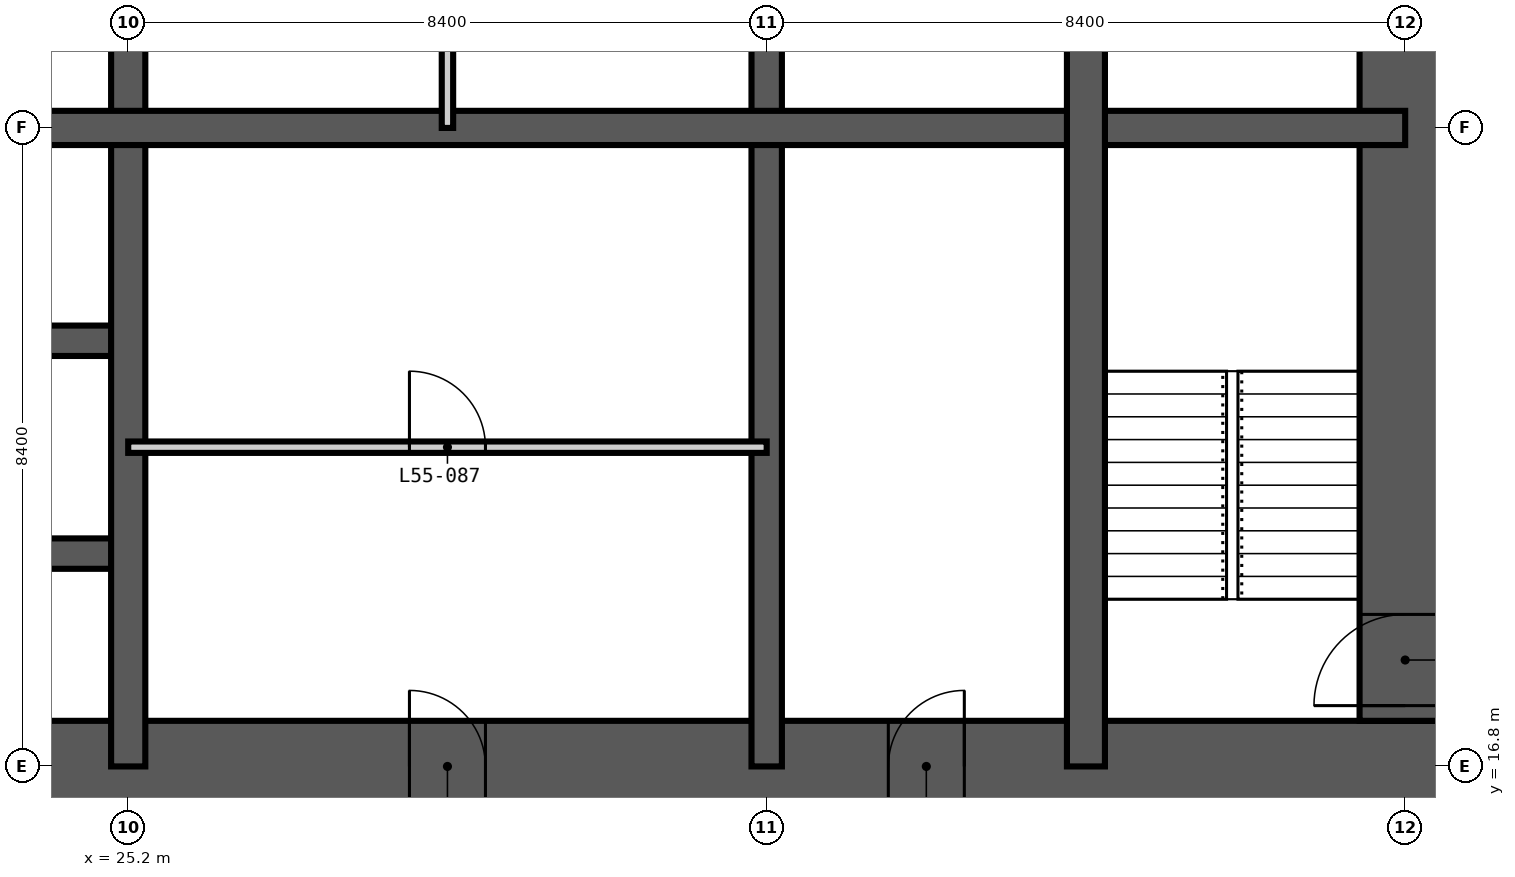
"""IFC4 building model, lengths in metres.
Left out: names, types, materials, properties, quantities, classifications, styles, units other than length and angle.
Written with IfcOpenShell. Run it as: python <this file> out.ifc"""

import sys

from ifc_helpers import new_model, si_unit, direction, frame, frame_2d, origin, place, context, subcontext, project, spatial, rectangle, extrude, element, fill, save


model = new_model("IFC4")
c1 = context("Model", 3, precision=1e-05, world=origin(), true_north=direction((0.0, 1.0)))
c2 = subcontext(c1, "Body", "Model", "MODEL_VIEW")
j1 = project(units=[si_unit("LENGTHUNIT", "METRE"), si_unit("PLANEANGLEUNIT", "RADIAN")], contexts=[c1])
p1 = place(None, origin())
s1 = spatial("IfcSite", under=j1, at=p1, CompositionType="ELEMENT")
p2 = place(p1, origin())
s2 = spatial("IfcBuilding", under=s1, at=p2, CompositionType="ELEMENT")
p3 = place(p2, frame((0.0, 0.0, 213.0)))
s3 = spatial("IfcBuildingStorey", under=s2, at=p3, CompositionType="ELEMENT", Elevation=213.0)
p4 = place(p3, frame((16.2, 16.8, -0.35), z_axis=(0.0, 0.0, 1.0), x_axis=(1.0, 0.0, 0.0)))
e1 = element("IfcWall", 1, at=p4, inside=s3, PredefinedType="SHEAR", context=c2, shape_type="SweptSolid", body=[
    extrude(rectangle(XDim=26.4, YDim=1.2, at=frame_2d((13.2, 0.0))), origin(), (0.0, 0.0, 1.0), 3.6),
])
p5 = place(p4, frame((12.7, 0.0, 0.35)))
e2 = element("IfcOpeningElement", 2, at=p5, cuts=e1, PredefinedType="OPENING", context=c2, shape_type="SweptSolid", body=[
    extrude(rectangle(XDim=1.0, YDim=2.1, at=frame_2d((0.5, 1.05))), frame((0.0, 0.61, 0.0), z_axis=(0.0, -1.0, 0.0), x_axis=(1.0, 0.0, 0.0)), (0.0, 0.0, 1.0), 1.22),
])
p6 = place(p4, frame((19.0, 0.0, 0.35)))
e3 = element("IfcOpeningElement", 3, at=p6, cuts=e1, PredefinedType="OPENING", context=c2, shape_type="SweptSolid", body=[
    extrude(rectangle(XDim=1.0, YDim=2.1, at=frame_2d((0.5, 1.05))), frame((0.0, 0.61, 0.0), z_axis=(0.0, -1.0, 0.0), x_axis=(1.0, 0.0, 0.0)), (0.0, 0.0, 1.0), 1.22),
])
p7 = place(p3, frame((42.0, 17.4, -0.35), z_axis=(0.0, 0.0, 1.0), x_axis=(0.0, 1.0, 0.0)))
e4 = element("IfcWall", 4, at=p7, inside=s3, PredefinedType="SHEAR", context=c2, shape_type="SweptSolid", body=[
    extrude(rectangle(XDim=24.0, YDim=1.2, at=frame_2d((12.0, 0.0))), origin(), (0.0, 0.0, 1.0), 3.6),
])
p8 = place(p7, frame((0.2, 0.0, 0.35)))
e5 = element("IfcOpeningElement", 5, at=p8, cuts=e4, PredefinedType="OPENING", context=c2, shape_type="SweptSolid", body=[
    extrude(rectangle(XDim=1.2, YDim=2.2, at=frame_2d((0.6, 1.1))), frame((0.0, 0.61, 0.0), z_axis=(0.0, -1.0, 0.0), x_axis=(1.0, 0.0, 0.0)), (0.0, 0.0, 1.0), 1.22),
])
p9 = place(p7, frame((11.5, 0.0, 0.35)))
e6 = element("IfcOpeningElement", 6, at=p9, cuts=e4, PredefinedType="OPENING", context=c2, shape_type="SweptSolid", body=[
    extrude(rectangle(XDim=1.0, YDim=2.1, at=frame_2d((0.5, 1.05))), frame((0.0, 0.61, 0.0), z_axis=(0.0, -1.0, 0.0), x_axis=(1.0, 0.0, 0.0)), (0.0, 0.0, 1.0), 1.22),
])
p10 = place(p7, frame((19.9, 0.0, 0.35)))
e7 = element("IfcOpeningElement", 7, at=p10, cuts=e4, PredefinedType="OPENING", context=c2, shape_type="SweptSolid", body=[
    extrude(rectangle(XDim=1.0, YDim=2.1, at=frame_2d((0.5, 1.05))), frame((0.0, 0.61, 0.0), z_axis=(0.0, -1.0, 0.0), x_axis=(1.0, 0.0, 0.0)), (0.0, 0.0, 1.0), 1.22),
])
p11 = place(p3, frame((33.6, 16.8, -0.35), z_axis=(0.0, 0.0, 1.0), x_axis=(0.0, 1.0, 0.0)))
e8 = element("IfcWall", 8, at=p11, inside=s3, PredefinedType="SHEAR", context=c2, shape_type="SweptSolid", body=[
    extrude(rectangle(XDim=25.2, YDim=0.4, at=frame_2d((12.6, 0.0))), origin(), (0.0, 0.0, 1.0), 3.6),
])
p12 = place(p11, frame((22.5, 0.0, 0.35)))
e9 = element("IfcOpeningElement", 9, at=p12, cuts=e8, PredefinedType="OPENING", context=c2, shape_type="SweptSolid", body=[
    extrude(rectangle(XDim=1.2, YDim=2.2, at=frame_2d((0.6, 1.1))), frame((0.0, 0.21, 0.0), z_axis=(0.0, -1.0, 0.0), x_axis=(1.0, 0.0, 0.0)), (0.0, 0.0, 1.0), 0.42),
])
p13 = place(p11, frame((18.3, 0.0, 0.35)))
e10 = element("IfcOpeningElement", 10, at=p13, cuts=e8, PredefinedType="OPENING", context=c2, shape_type="SweptSolid", body=[
    extrude(rectangle(XDim=1.2, YDim=2.2, at=frame_2d((0.6, 1.1))), frame((0.0, 0.21, 0.0), z_axis=(0.0, -1.0, 0.0), x_axis=(1.0, 0.0, 0.0)), (0.0, 0.0, 1.0), 0.42),
])
p14 = place(p11, frame((12.1, 0.0, 0.35)))
e11 = element("IfcOpeningElement", 11, at=p14, cuts=e8, PredefinedType="OPENING", context=c2, shape_type="SweptSolid", body=[
    extrude(rectangle(XDim=1.0, YDim=2.1, at=frame_2d((0.5, 1.05))), frame((0.0, 0.21, 0.0), z_axis=(0.0, -1.0, 0.0), x_axis=(1.0, 0.0, 0.0)), (0.0, 0.0, 1.0), 0.42),
])
p15 = place(p3, frame((16.8, 19.6, -0.35), z_axis=(0.0, 0.0, 1.0), x_axis=(1.0, 0.0, 0.0)))
e12 = element("IfcWall", 12, at=p15, inside=s3, PredefinedType="SHEAR", context=c2, shape_type="SweptSolid", body=[
    extrude(rectangle(XDim=8.4, YDim=0.4, at=frame_2d((4.2, 0.0))), origin(), (0.0, 0.0, 1.0), 3.6),
])
p16 = place(p15, frame((1.6, 0.0, 0.35)))
e13 = element("IfcOpeningElement", 13, at=p16, cuts=e12, PredefinedType="OPENING", context=c2, shape_type="SweptSolid", body=[
    extrude(rectangle(XDim=1.0, YDim=2.1, at=frame_2d((0.5, 1.05))), frame((0.0, 0.21, 0.0), z_axis=(0.0, -1.0, 0.0), x_axis=(1.0, 0.0, 0.0)), (0.0, 0.0, 1.0), 0.42),
])
p17 = place(p15, frame((5.8, 0.0, 0.35)))
e14 = element("IfcOpeningElement", 14, at=p17, cuts=e12, PredefinedType="OPENING", context=c2, shape_type="SweptSolid", body=[
    extrude(rectangle(XDim=1.0, YDim=2.1, at=frame_2d((0.5, 1.05))), frame((0.0, 0.21, 0.0), z_axis=(0.0, -1.0, 0.0), x_axis=(1.0, 0.0, 0.0)), (0.0, 0.0, 1.0), 0.42),
])
p18 = place(p3, frame((16.8, 22.4, -0.35), z_axis=(0.0, 0.0, 1.0), x_axis=(1.0, 0.0, 0.0)))
e15 = element("IfcWall", 15, at=p18, inside=s3, PredefinedType="SHEAR", context=c2, shape_type="SweptSolid", body=[
    extrude(rectangle(XDim=8.4, YDim=0.4, at=frame_2d((4.2, 0.0))), origin(), (0.0, 0.0, 1.0), 3.6),
])
p19 = place(p18, frame((1.6, 0.0, 0.35)))
e16 = element("IfcOpeningElement", 16, at=p19, cuts=e15, PredefinedType="OPENING", context=c2, shape_type="SweptSolid", body=[
    extrude(rectangle(XDim=1.0, YDim=2.1, at=frame_2d((0.5, 1.05))), frame((0.0, 0.21, 0.0), z_axis=(0.0, -1.0, 0.0), x_axis=(1.0, 0.0, 0.0)), (0.0, 0.0, 1.0), 0.42),
])
p20 = place(p18, frame((5.8, 0.0, 0.35)))
e17 = element("IfcOpeningElement", 17, at=p20, cuts=e15, PredefinedType="OPENING", context=c2, shape_type="SweptSolid", body=[
    extrude(rectangle(XDim=1.0, YDim=2.1, at=frame_2d((0.5, 1.05))), frame((0.0, 0.21, 0.0), z_axis=(0.0, -1.0, 0.0), x_axis=(1.0, 0.0, 0.0)), (0.0, 0.0, 1.0), 0.42),
])
for number, where, z_axis, x_axis in (
    (18, (25.2, 16.8, -0.35), (0.0, 0.0, 1.0), (0.0, 1.0, 0.0)),
    (19, (16.8, 25.2, -0.35), (0.0, 0.0, 1.0), (1.0, 0.0, 0.0)),
):
    element("IfcWall", number, at=place(p3, frame(where, z_axis=z_axis, x_axis=x_axis)), inside=s3, PredefinedType="SHEAR", context=c2, shape_type="SweptSolid", body=[
        extrude(rectangle(XDim=25.2, YDim=0.45, at=frame_2d((12.6, 0.0))), origin(), (0.0, 0.0, 1.0), 3.6),
    ])
p21 = place(p3, frame((37.8, 16.8, -0.35), z_axis=(0.0, 0.0, 1.0), x_axis=(0.0, 1.0, 0.0)))
e20 = element("IfcWall", 20, at=p21, inside=s3, PredefinedType="SHEAR", context=c2, shape_type="SweptSolid", body=[
    extrude(rectangle(XDim=11.2, YDim=0.5, at=frame_2d((5.6, 0.0))), origin(), (0.0, 0.0, 1.0), 3.6),
])
p22 = place(p3, frame((29.4, 25.2, 0.0), z_axis=(0.0, 0.0, 1.0), x_axis=(0.0, 1.0, 0.0)))
e21 = element("IfcWall", 21, at=p22, inside=s3, PredefinedType="PARTITIONING", context=c2, shape_type="SweptSolid", body=[
    extrude(rectangle(XDim=8.4, YDim=0.15, at=frame_2d((4.2, 0.0))), origin(), (0.0, 0.0, 1.0), 3.25),
])
p23 = place(p22, frame((3.7, 0.0, 0.0)))
e22 = element("IfcOpeningElement", 22, at=p23, cuts=e21, PredefinedType="OPENING", context=c2, shape_type="SweptSolid", body=[
    extrude(rectangle(XDim=1.0, YDim=2.1, at=frame_2d((0.5, 1.05))), frame((0.0, 0.085, 0.0), z_axis=(0.0, -1.0, 0.0), x_axis=(1.0, 0.0, 0.0)), (0.0, 0.0, 1.0), 0.17),
])
p24 = place(p3, frame((25.2, 21.0, 0.0), z_axis=(0.0, 0.0, 1.0), x_axis=(1.0, 0.0, 0.0)))
e23 = element("IfcWall", 23, at=p24, inside=s3, PredefinedType="PARTITIONING", context=c2, shape_type="SweptSolid", body=[
    extrude(rectangle(XDim=8.4, YDim=0.15, at=frame_2d((4.2, 0.0))), origin(), (0.0, 0.0, 1.0), 3.25),
])
p25 = place(p24, frame((3.7, 0.0, 0.0)))
e24 = element("IfcOpeningElement", 24, at=p25, cuts=e23, PredefinedType="OPENING", context=c2, shape_type="SweptSolid", body=[
    extrude(rectangle(XDim=1.0, YDim=2.1, at=frame_2d((0.5, 1.05))), frame((0.0, 0.085, 0.0), z_axis=(0.0, -1.0, 0.0), x_axis=(1.0, 0.0, 0.0)), (0.0, 0.0, 1.0), 0.17),
])
p26 = place(p8, origin())
e25 = element("IfcDoor", 25, at=p26, inside=s3, OperationType="SINGLE_SWING_LEFT", PredefinedType="DOOR", context=c2, shape_type="SweptSolid", body=[
    extrude(rectangle(XDim=1.2, YDim=2.2, at=frame_2d((0.6, 1.1))), frame((0.0, 0.025, 0.0), z_axis=(0.0, -1.0, 0.0), x_axis=(1.0, 0.0, 0.0)), (0.0, 0.0, 1.0), 0.05),
])
fill(e5, e25)
p27 = place(p5, origin())
e26 = element("IfcDoor", 26, at=p27, inside=s3, OperationType="SINGLE_SWING_LEFT", PredefinedType="DOOR", context=c2, shape_type="SweptSolid", body=[
    extrude(rectangle(XDim=1.0, YDim=2.1, at=frame_2d((0.5, 1.05))), frame((0.0, 0.025, 0.0), z_axis=(0.0, -1.0, 0.0), x_axis=(1.0, 0.0, 0.0)), (0.0, 0.0, 1.0), 0.05),
])
fill(e2, e26)
p28 = place(p25, origin())
e27 = element("IfcDoor", 27, at=p28, inside=s3, OperationType="SINGLE_SWING_LEFT", PredefinedType="DOOR", context=c2, shape_type="SweptSolid", body=[
    extrude(rectangle(XDim=1.0, YDim=2.1, at=frame_2d((0.5, 1.05))), frame((0.0, 0.025, 0.0), z_axis=(0.0, -1.0, 0.0), x_axis=(1.0, 0.0, 0.0)), (0.0, 0.0, 1.0), 0.05),
])
fill(e24, e27)
p29 = place(p6, origin())
e28 = element("IfcDoor", 28, at=p29, inside=s3, OperationType="SINGLE_SWING_RIGHT", PredefinedType="DOOR", context=c2, shape_type="SweptSolid", body=[
    extrude(rectangle(XDim=1.0, YDim=2.1, at=frame_2d((0.5, 1.05))), frame((0.0, 0.025, 0.0), z_axis=(0.0, -1.0, 0.0), x_axis=(1.0, 0.0, 0.0)), (0.0, 0.0, 1.0), 0.05),
])
fill(e3, e28)
save(model, sys.argv[1])
